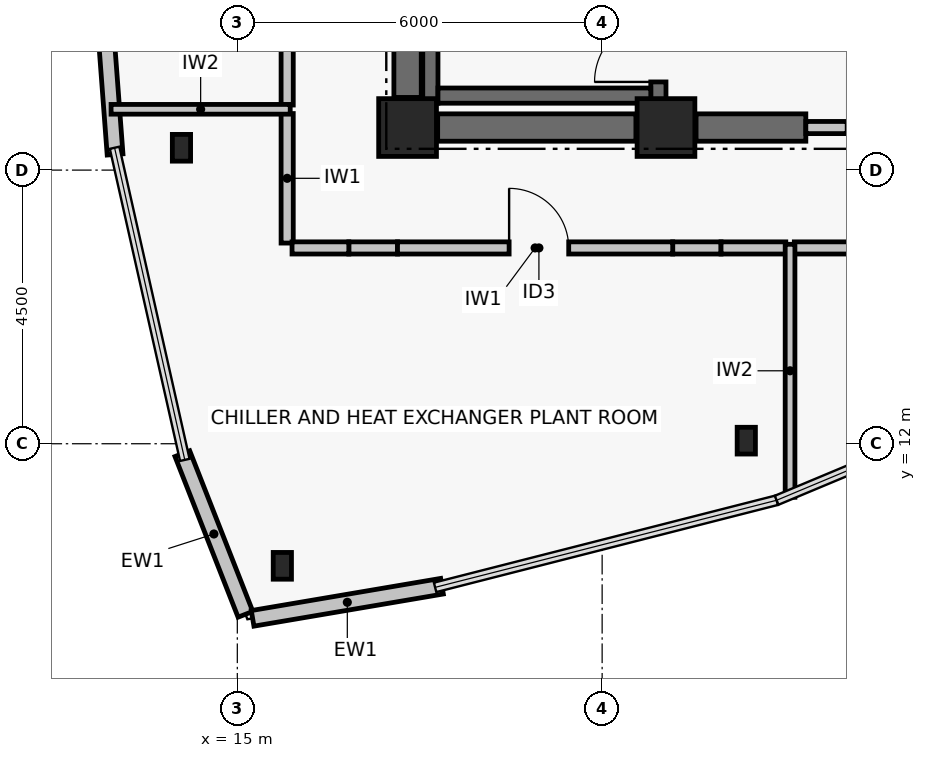
"""IFC4 building model, lengths in metres.
Left out: names, types, materials, properties, quantities, classifications, styles, units other than length and angle.
Written with IfcOpenShell. Run it as: python <this file> out.ifc"""

import sys

from ifc_helpers import new_model, si_unit, direction, frame, frame_2d, origin, origin_2d, place, context, subcontext, project, spatial, rectangle, i_section, extrude, element, fill, save


model = new_model("IFC4")
c1 = context("Model", 3, precision=1e-05, world=origin(), true_north=direction((0.0, 1.0)))
c2 = subcontext(c1, "Body", "Model", "MODEL_VIEW")
j1 = project(units=[si_unit("LENGTHUNIT", "METRE"), si_unit("PLANEANGLEUNIT", "RADIAN")], contexts=[c1])
p1 = place(None, origin())
s1 = spatial("IfcSite", under=j1, at=p1, CompositionType="ELEMENT")
p2 = place(p1, origin())
s2 = spatial("IfcBuilding", under=s1, at=p2, CompositionType="ELEMENT")
p3 = place(p2, frame((0.0, 0.0, 315.22)))
s3 = spatial("IfcBuildingStorey", under=s2, at=p3, CompositionType="ELEMENT", Elevation=315.22)
for number, where, z_axis, x_axis in (
    (1, (17.8, 17.2, 0.0), (0.0, 0.0, 1.0), (1.0, 0.0, 0.0)),
    (2, (22.05, 17.2, 0.0), (0.0, 0.0, 1.0), (1.0, 0.0, 0.0)),
):
    element("IfcColumn", number, at=place(p3, frame(where, z_axis=z_axis, x_axis=x_axis)), inside=s3, PredefinedType="COLUMN", context=c2, shape_type="SweptSolid", body=[
        extrude(rectangle(XDim=0.95, YDim=0.95, at=origin_2d()), origin(), (0.0, 0.0, 1.0), 3.2),
    ])
p4 = place(p3, frame((18.295, 17.2, 0.0), z_axis=(0.0, 0.0, 1.0), x_axis=(1.0, 0.0, 0.0)))
e3 = element("IfcWall", 3, at=p4, inside=s3, PredefinedType="SHEAR", context=c2, shape_type="SweptSolid", body=[
    extrude(rectangle(XDim=3.26, YDim=0.45, at=frame_2d((1.63, 0.0))), origin(), (0.0, 0.0, 1.0), 2.96),
])
p5 = place(p3, frame((22.545, 17.2, 0.0), z_axis=(0.0, 0.0, 1.0), x_axis=(1.0, 0.0, 0.0)))
e4 = element("IfcWall", 4, at=p5, inside=s3, PredefinedType="SHEAR", context=c2, shape_type="SweptSolid", body=[
    extrude(rectangle(XDim=1.805, YDim=0.45, at=frame_2d((0.903, 0.0))), origin(), (0.0, 0.0, 1.0), 2.96),
])
p6 = place(p3, frame((17.8, 17.695, 0.0), z_axis=(0.0, 0.0, 1.0), x_axis=(0.0, 1.0, 0.0)))
e5 = element("IfcWall", 5, at=p6, inside=s3, PredefinedType="SHEAR", context=c2, shape_type="SweptSolid", body=[
    extrude(rectangle(XDim=8.61, YDim=0.45, at=frame_2d((4.305, 0.0))), origin(), (0.0, 0.0, 1.0), 2.96),
])
p7 = place(p3, frame((18.175, 17.6, 0.0), z_axis=(0.0, 0.0, 1.0), x_axis=(0.0, 1.0, 0.0)))
e6 = element("IfcWall", 6, at=p7, inside=s3, PredefinedType="SHEAR", context=c2, shape_type="SweptSolid", body=[
    extrude(rectangle(XDim=8.8, YDim=0.25, at=frame_2d((4.4, 0.0))), origin(), (0.0, 0.0, 1.0), 2.96),
])
p8 = place(p3, frame((21.925, 17.6, 0.0), z_axis=(0.0, 0.0, 1.0), x_axis=(0.0, 1.0, 0.0)))
e7 = element("IfcWall", 7, at=p8, inside=s3, PredefinedType="SHEAR", context=c2, shape_type="SweptSolid", body=[
    extrude(rectangle(XDim=8.8, YDim=0.25, at=frame_2d((4.4, 0.0))), origin(), (0.0, 0.0, 1.0), 2.96),
])
p9 = place(p8, frame((0.35, 0.0, 0.0)))
e8 = element("IfcOpeningElement", 8, at=p9, cuts=e7, PredefinedType="OPENING", context=c2, shape_type="SweptSolid", body=[
    extrude(rectangle(XDim=1.05, YDim=2.08, at=frame_2d((0.525, 1.04))), frame((0.0, 0.135, 0.0), z_axis=(0.0, -1.0, 0.0), x_axis=(1.0, 0.0, 0.0)), (0.0, 0.0, 1.0), 0.27),
])
p10 = place(p3, frame((18.3, 17.725, 0.0), z_axis=(0.0, 0.0, 1.0), x_axis=(1.0, 0.0, 0.0)))
e9 = element("IfcWall", 9, at=p10, inside=s3, PredefinedType="SHEAR", context=c2, shape_type="SweptSolid", body=[
    extrude(rectangle(XDim=3.5, YDim=0.25, at=frame_2d((1.75, 0.0))), origin(), (0.0, 0.0, 1.0), 2.96),
])
for number, where, z_axis, x_axis in (
    (10, (14.081, 16.867, 0.0), (0.0, 0.0, 1.0), (1.0, 0.0, 0.0)),
    (11, (15.74, 9.992, 0.0), (0.0, 0.0, 1.0), (1.0, 0.0, 0.0)),
    (12, (23.371, 12.051, 0.0), (0.0, 0.0, 1.0), (1.0, 0.0, 0.0)),
):
    element("IfcColumn", number, at=place(p3, frame(where, z_axis=z_axis, x_axis=x_axis)), inside=s3, PredefinedType="COLUMN", context=c2, shape_type="SweptSolid", body=[
        extrude(i_section(OverallWidth=0.3, OverallDepth=0.44, WebThickness=0.011, FlangeThickness=0.018, at=origin_2d()), origin(), (0.0, 0.0, 1.0), 3.2),
    ])
p11 = place(p3, frame((12.99, 16.758, 0.0), z_axis=(0.0, 0.0, 1.0), x_axis=(-0.074768012725, 0.99720095481, 0.0)))
e13 = element("IfcWall", 13, at=p11, inside=s3, PredefinedType="PARTITIONING", context=c2, shape_type="SweptSolid", body=[
    extrude(rectangle(XDim=5.257, YDim=0.26, at=frame_2d((2.628, 0.0))), origin(), (0.0, 0.0, 1.0), 2.96),
])
p12 = place(p3, frame((15.134, 9.195, 0.0), z_axis=(0.0, 0.0, 1.0), x_axis=(-0.365495346637, 0.930813166853, 0.0)))
e14 = element("IfcWall", 14, at=p12, inside=s3, PredefinedType="PARTITIONING", context=c2, shape_type="SweptSolid", body=[
    extrude(rectangle(XDim=2.838, YDim=0.26, at=frame_2d((1.419, 0.0))), origin(), (0.0, 0.0, 1.0), 2.96),
])
p13 = place(p3, frame((18.366, 9.657, 0.0), z_axis=(0.0, 0.0, 1.0), x_axis=(-0.985905089134, -0.167305574383, 0.0)))
e15 = element("IfcWall", 15, at=p13, inside=s3, PredefinedType="PARTITIONING", context=c2, shape_type="SweptSolid", body=[
    extrude(rectangle(XDim=3.159, YDim=0.26, at=frame_2d((1.58, 0.0))), origin(), (0.0, 0.0, 1.0), 2.96),
])
p14 = place(p3, frame((24.35, 17.2, 0.0), z_axis=(0.0, 0.0, 1.0), x_axis=(1.0, 0.0, 0.0)))
e16 = element("IfcWall", 16, at=p14, inside=s3, PredefinedType="PARTITIONING", context=c2, shape_type="SweptSolid", body=[
    extrude(rectangle(XDim=2.5, YDim=0.2, at=frame_2d((1.25, 0.0))), origin(), (0.0, 0.0, 1.0), 2.09),
])
p15 = place(p14, frame((0.68, 0.0, 0.0)))
e17 = element("IfcOpeningElement", 17, at=p15, cuts=e16, PredefinedType="OPENING", context=c2, shape_type="SweptSolid", body=[
    extrude(rectangle(XDim=1.15, YDim=2.08, at=frame_2d((0.575, 1.04))), frame((0.0, 0.11, 0.0), z_axis=(0.0, -1.0, 0.0), x_axis=(1.0, 0.0, 0.0)), (0.0, 0.0, 1.0), 0.22),
])
p16 = place(p3, frame((15.82, 17.43, 0.0), z_axis=(0.0, 0.0, 1.0), x_axis=(0.0, -1.0, 0.0)))
e18 = element("IfcWall", 18, at=p16, inside=s3, PredefinedType="PARTITIONING", context=c2, shape_type="SweptSolid", body=[
    extrude(rectangle(XDim=2.13, YDim=0.2, at=frame_2d((1.065, 0.0))), origin(), (0.0, 0.0, 1.0), 1.85),
])
p17 = place(p3, frame((16.834, 15.22, 0.0), z_axis=(0.0, 0.0, 1.0), x_axis=(1.0, 0.0, 0.0)))
e19 = element("IfcWall", 19, at=p17, inside=s3, PredefinedType="PARTITIONING", context=c2, shape_type="SweptSolid", body=[
    extrude(rectangle(XDim=0.801, YDim=0.2, at=frame_2d((0.4, 0.0))), origin(), (0.0, 0.0, 1.0), 1.84),
])
p18 = place(p3, frame((22.16, 15.22, 0.0), z_axis=(0.0, 0.0, 1.0), x_axis=(1.0, 0.0, 0.0)))
e20 = element("IfcWall", 20, at=p18, inside=s3, PredefinedType="PARTITIONING", context=c2, shape_type="SweptSolid", body=[
    extrude(rectangle(XDim=0.795, YDim=0.2, at=frame_2d((0.397, 0.0))), origin(), (0.0, 0.0, 1.0), 1.84),
])
p19 = place(p3, frame((15.9, 15.22, 0.0), z_axis=(0.0, 0.0, 1.0), x_axis=(1.0, 0.0, 0.0)))
e21 = element("IfcWall", 21, at=p19, inside=s3, PredefinedType="PARTITIONING", context=c2, shape_type="SweptSolid", body=[
    extrude(rectangle(XDim=0.934, YDim=0.2, at=frame_2d((0.467, 0.0))), origin(), (0.0, 0.0, 1.0), 2.59),
])
p20 = place(p3, frame((22.955, 15.22, 0.0), z_axis=(0.0, 0.0, 1.0), x_axis=(1.0, 0.0, 0.0)))
e22 = element("IfcWall", 22, at=p20, inside=s3, PredefinedType="PARTITIONING", context=c2, shape_type="SweptSolid", body=[
    extrude(rectangle(XDim=1.065, YDim=0.2, at=frame_2d((0.533, 0.0))), origin(), (0.0, 0.0, 1.0), 2.96),
])
p21 = place(p3, frame((17.635, 15.22, 0.0), z_axis=(0.0, 0.0, 1.0), x_axis=(1.0, 0.0, 0.0)))
e23 = element("IfcWall", 23, at=p21, inside=s3, PredefinedType="PARTITIONING", context=c2, shape_type="SweptSolid", body=[
    extrude(rectangle(XDim=4.526, YDim=0.2, at=frame_2d((2.263, 0.0))), origin(), (0.0, 0.0, 1.0), 2.59),
])
p22 = place(p21, frame((1.836, 0.0, 0.0)))
e24 = element("IfcOpeningElement", 24, at=p22, cuts=e23, PredefinedType="OPENING", context=c2, shape_type="SweptSolid", body=[
    extrude(rectangle(XDim=0.98, YDim=2.06, at=frame_2d((0.49, 1.03))), frame((0.0, 0.11, 0.0), z_axis=(0.0, -1.0, 0.0), x_axis=(1.0, 0.0, 0.0)), (0.0, 0.0, 1.0), 0.22),
])
p23 = place(p3, frame((24.16, 15.22, 0.0), z_axis=(0.0, 0.0, 1.0), x_axis=(1.0, 0.0, 0.0)))
e25 = element("IfcWall", 25, at=p23, inside=s3, PredefinedType="PARTITIONING", context=c2, shape_type="SweptSolid", body=[
    extrude(rectangle(XDim=4.545, YDim=0.2, at=frame_2d((2.273, 0.0))), origin(), (0.0, 0.0, 1.0), 2.96),
])
p24 = place(p23, frame((1.031, 0.0, 0.0)))
e26 = element("IfcOpeningElement", 26, at=p24, cuts=e25, PredefinedType="OPENING", context=c2, shape_type="SweptSolid", body=[
    extrude(rectangle(XDim=0.98, YDim=2.06, at=frame_2d((0.49, 1.03))), frame((0.0, 0.11, 0.0), z_axis=(0.0, -1.0, 0.0), x_axis=(1.0, 0.0, 0.0)), (0.0, 0.0, 1.0), 0.22),
])
p25 = place(p3, frame((15.82, 26.43, 0.0), z_axis=(0.0, 0.0, 1.0), x_axis=(0.0, -1.0, 0.0)))
e27 = element("IfcWall", 27, at=p25, inside=s3, PredefinedType="PARTITIONING", context=c2, shape_type="SweptSolid", body=[
    extrude(rectangle(XDim=8.86, YDim=0.2, at=frame_2d((4.43, 0.0))), origin(), (0.0, 0.0, 1.0), 2.59),
])
p26 = place(p25, frame((3.94, 0.0, 0.0)))
e28 = element("IfcOpeningElement", 28, at=p26, cuts=e27, PredefinedType="OPENING", context=c2, shape_type="SweptSolid", body=[
    extrude(rectangle(XDim=0.98, YDim=2.06, at=frame_2d((0.49, 1.03))), frame((0.0, 0.11, 0.0), z_axis=(0.0, -1.0, 0.0), x_axis=(1.0, 0.0, 0.0)), (0.0, 0.0, 1.0), 0.22),
])
p27 = place(p3, frame((12.924, 17.5, 0.0), z_axis=(0.0, 0.0, 1.0), x_axis=(1.0, 0.0, 0.0)))
e29 = element("IfcWall", 29, at=p27, inside=s3, PredefinedType="PARTITIONING", context=c2, shape_type="SweptSolid", body=[
    extrude(rectangle(XDim=2.946, YDim=0.16, at=frame_2d((1.473, 0.0))), origin(), (0.0, 0.0, 1.0), 2.44),
])
p28 = place(p3, frame((24.091, 11.119, 0.0), z_axis=(0.0, 0.0, 1.0), x_axis=(0.0, 1.0, 0.0)))
e30 = element("IfcWall", 30, at=p28, inside=s3, PredefinedType="PARTITIONING", context=c2, shape_type="SweptSolid", body=[
    extrude(rectangle(XDim=4.161, YDim=0.16, at=frame_2d((2.08, 0.0))), origin(), (0.0, 0.0, 1.0), 2.44),
])
p29 = place(p9, origin())
e31 = element("IfcDoor", 31, at=p29, inside=s3, OperationType="SINGLE_SWING_LEFT", PredefinedType="DOOR", context=c2, shape_type="SweptSolid", body=[
    extrude(rectangle(XDim=1.05, YDim=2.08, at=frame_2d((0.525, 1.04))), frame((0.0, 0.025, 0.0), z_axis=(0.0, -1.0, 0.0), x_axis=(1.0, 0.0, 0.0)), (0.0, 0.0, 1.0), 0.05),
])
fill(e8, e31)
p30 = place(p22, origin())
e32 = element("IfcDoor", 32, at=p30, inside=s3, OperationType="SINGLE_SWING_LEFT", PredefinedType="DOOR", context=c2, shape_type="SweptSolid", body=[
    extrude(rectangle(XDim=0.98, YDim=2.06, at=frame_2d((0.49, 1.03))), frame((0.0, 0.025, 0.0), z_axis=(0.0, -1.0, 0.0), x_axis=(1.0, 0.0, 0.0)), (0.0, 0.0, 1.0), 0.05),
])
fill(e24, e32)
save(model, sys.argv[1])
